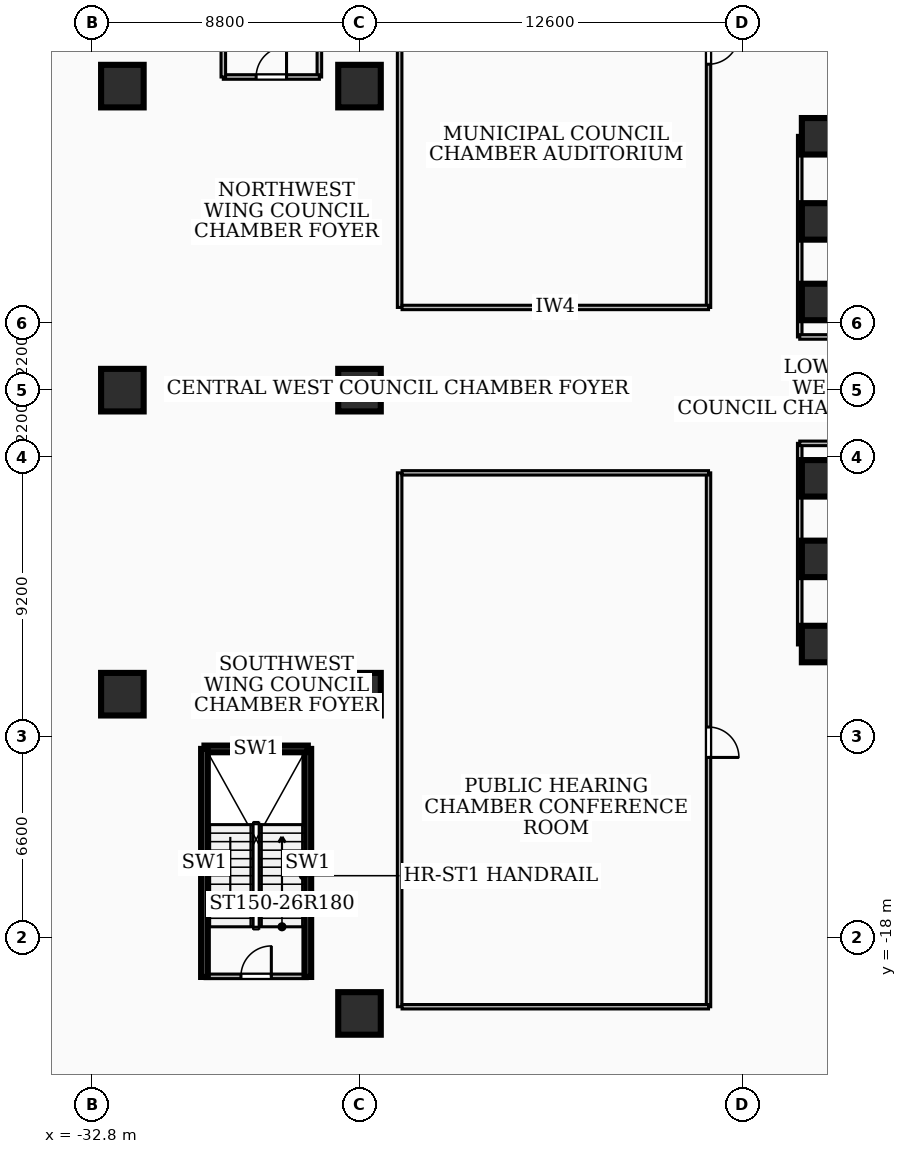
"""IFC4 building model, lengths in metres.
Left out: names, types, materials, properties, quantities, classifications, styles, units other than length and angle.
Written with IfcOpenShell. Run it as: python <this file> out.ifc"""

import sys

from ifc_helpers import new_model, si_unit, direction, frame, frame_2d, origin, origin_2d, place, context, subcontext, project, spatial, rectangle, extrude, element, fill, save


model = new_model("IFC4")
c1 = context("Model", 3, precision=1e-05, world=origin(), true_north=direction((0.0, 1.0)))
c2 = subcontext(c1, "Body", "Model", "MODEL_VIEW")
j1 = project(units=[si_unit("LENGTHUNIT", "METRE"), si_unit("PLANEANGLEUNIT", "RADIAN")], contexts=[c1])
p1 = place(None, origin())
s1 = spatial("IfcSite", under=j1, at=p1, CompositionType="ELEMENT")
p2 = place(p1, origin())
s2 = spatial("IfcBuilding", under=s1, at=p2, CompositionType="ELEMENT")
p3 = place(p2, frame((0.0, 0.0, 10.08)))
s3 = spatial("IfcBuildingStorey", under=s2, at=p3, CompositionType="ELEMENT", Elevation=10.08)
for number, where, z_axis, x_axis in (
    (1, (-8.78, 8.585, 0.0), (0.0, 0.0, 1.0), (1.0, 0.0, 0.0)),
    (2, (8.78, -8.585, 0.0), (0.0, 0.0, 1.0), (-1.0, 0.0, 0.0)),
):
    element("IfcWall", number, at=place(p3, frame(where, z_axis=z_axis, x_axis=x_axis)), inside=s3, PredefinedType="SHEAR", context=c2, shape_type="SweptSolid", body=[
        extrude(rectangle(XDim=17.56, YDim=0.55, at=frame_2d((8.78, 0.0))), origin(), (0.0, 0.0, 1.0), 4.36),
    ])
for number, where, z_axis, x_axis in (
    (3, (-29.1, -19.3, 0.0), (0.0, 0.0, 1.0), (0.0, 1.0, 0.0)),
    (4, (-25.7, -19.3, 0.0), (0.0, 0.0, 1.0), (0.0, 1.0, 0.0)),
):
    element("IfcWall", number, at=place(p3, frame(where, z_axis=z_axis, x_axis=x_axis)), inside=s3, PredefinedType="SOLIDWALL", context=c2, shape_type="SweptSolid", body=[
        extrude(rectangle(XDim=7.5, YDim=0.22, at=frame_2d((3.75, 0.0))), origin(), (0.0, 0.0, 1.0), 4.36),
    ])
p4 = place(p3, frame((-29.1, -11.8, 0.0), z_axis=(0.0, 0.0, 1.0), x_axis=(1.0, 0.0, 0.0)))
e5 = element("IfcWall", 5, at=p4, inside=s3, PredefinedType="SOLIDWALL", context=c2, shape_type="SweptSolid", body=[
    extrude(rectangle(XDim=3.4, YDim=0.22, at=frame_2d((1.7, 0.0))), origin(), (0.0, 0.0, 1.0), 4.36),
])
for number, where, z_axis, x_axis in (
    (6, (-8.85, -5.55, 0.0), (0.0, 0.0, 1.0), (1.0, 0.0, 0.0)),
    (7, (-8.85, -2.9, 0.0), (0.0, 0.0, 1.0), (1.0, 0.0, 0.0)),
    (8, (-8.85, 2.9, 0.0), (0.0, 0.0, 1.0), (1.0, 0.0, 0.0)),
    (9, (-8.85, 5.55, 0.0), (0.0, 0.0, 1.0), (1.0, 0.0, 0.0)),
    (10, (-8.85, 8.35, 0.0), (0.0, 0.0, 1.0), (1.0, 0.0, 0.0)),
    (11, (-8.85, -8.35, 0.0), (0.0, 0.0, 1.0), (1.0, 0.0, 0.0)),
):
    element("IfcColumn", number, at=place(p3, frame(where, z_axis=z_axis, x_axis=x_axis)), inside=s3, PredefinedType="COLUMN", context=c2, shape_type="SweptSolid", body=[
        extrude(rectangle(XDim=1.2, YDim=1.2, at=origin_2d()), origin(), (0.0, 0.0, 1.0), 4.68),
    ])
for number, where, z_axis, x_axis in (
    (12, (-31.8, -10.0, 0.0), (0.0, 0.0, 1.0), (1.0, 0.0, 0.0)),
    (13, (-31.8, 0.0, 0.0), (0.0, 0.0, 1.0), (1.0, 0.0, 0.0)),
    (14, (-31.8, 10.0, 0.0), (0.0, 0.0, 1.0), (1.0, 0.0, 0.0)),
    (15, (-24.0, -10.0, 0.0), (0.0, 0.0, 1.0), (1.0, 0.0, 0.0)),
    (16, (-24.0, 0.0, 0.0), (0.0, 0.0, 1.0), (1.0, 0.0, 0.0)),
    (17, (-24.0, 10.0, 0.0), (0.0, 0.0, 1.0), (1.0, 0.0, 0.0)),
    (18, (-24.0, -20.5, 0.0), (0.0, 0.0, 1.0), (1.0, 0.0, 0.0)),
):
    element("IfcColumn", number, at=place(p3, frame(where, z_axis=z_axis, x_axis=x_axis)), inside=s3, PredefinedType="COLUMN", context=c2, shape_type="SweptSolid", body=[
        extrude(rectangle(XDim=1.4, YDim=1.4, at=origin_2d()), origin(), (0.0, 0.0, 1.0), 4.68),
    ])
p5 = place(p3, frame((-29.08, -19.28, 0.0), z_axis=(0.0, 0.0, 1.0), x_axis=(1.0, 0.0, 0.0)))
e19 = element("IfcWall", 19, at=p5, inside=s3, PredefinedType="PARTITIONING", context=c2, shape_type="SweptSolid", body=[
    extrude(rectangle(XDim=3.36, YDim=0.15, at=frame_2d((1.68, 0.0))), origin(), (0.0, 0.0, 1.0), 4.36),
])
p6 = place(p5, frame((1.18, 0.0, 0.0)))
e20 = element("IfcOpeningElement", 20, at=p6, cuts=e19, PredefinedType="OPENING", context=c2, shape_type="SweptSolid", body=[
    extrude(rectangle(XDim=1.0, YDim=2.1, at=frame_2d((0.5, 1.05))), frame((0.0, 0.085, 0.0), z_axis=(0.0, -1.0, 0.0), x_axis=(1.0, 0.0, 0.0)), (0.0, 0.0, 1.0), 0.17),
])
for number, where, z_axis, x_axis in (
    (21, (-28.48, 10.3, 0.0), (0.0, 0.0, 1.0), (0.0, 1.0, 0.0)),
    (22, (-25.32, 10.3, 0.0), (0.0, 0.0, 1.0), (0.0, 1.0, 0.0)),
):
    element("IfcWall", number, at=place(p3, frame(where, z_axis=z_axis, x_axis=x_axis)), inside=s3, PredefinedType="PARTITIONING", context=c2, shape_type="SweptSolid", body=[
        extrude(rectangle(XDim=9.8, YDim=0.15, at=frame_2d((4.9, 0.0))), origin(), (0.0, 0.0, 1.0), 4.36),
    ])
p7 = place(p3, frame((-28.48, 10.3, 0.0), z_axis=(0.0, 0.0, 1.0), x_axis=(1.0, 0.0, 0.0)))
e23 = element("IfcWall", 23, at=p7, inside=s3, PredefinedType="PARTITIONING", context=c2, shape_type="SweptSolid", body=[
    extrude(rectangle(XDim=3.16, YDim=0.15, at=frame_2d((1.58, 0.0))), origin(), (0.0, 0.0, 1.0), 3.37),
])
p8 = place(p7, frame((1.08, 0.0, 0.0)))
e24 = element("IfcOpeningElement", 24, at=p8, cuts=e23, PredefinedType="OPENING", context=c2, shape_type="SweptSolid", body=[
    extrude(rectangle(XDim=1.0, YDim=2.1, at=frame_2d((0.5, 1.05))), frame((0.0, 0.085, 0.0), z_axis=(0.0, -1.0, 0.0), x_axis=(1.0, 0.0, 0.0)), (0.0, 0.0, 1.0), 0.17),
])
p9 = place(p3, frame((-9.52, 1.75, 0.0), z_axis=(0.0, 0.0, 1.0), x_axis=(0.0, 1.0, 0.0)))
e25 = element("IfcWall", 25, at=p9, inside=s3, PredefinedType="PARTITIONING", context=c2, shape_type="SweptSolid", body=[
    extrude(rectangle(XDim=6.63, YDim=0.15, at=frame_2d((3.315, 0.0))), origin(), (0.0, 0.0, 1.0), 3.37),
])
p10 = place(p3, frame((-7.85, 1.75, 0.0), z_axis=(0.0, 0.0, 1.0), x_axis=(-1.0, 0.0, 0.0)))
e26 = element("IfcWall", 26, at=p10, inside=s3, PredefinedType="PARTITIONING", context=c2, shape_type="SweptSolid", body=[
    extrude(rectangle(XDim=1.67, YDim=0.15, at=frame_2d((0.835, 0.0))), origin(), (0.0, 0.0, 1.0), 3.425),
])
p11 = place(p3, frame((-9.52, -8.38, 0.0), z_axis=(0.0, 0.0, 1.0), x_axis=(0.0, 1.0, 0.0)))
e27 = element("IfcWall", 27, at=p11, inside=s3, PredefinedType="PARTITIONING", context=c2, shape_type="SweptSolid", body=[
    extrude(rectangle(XDim=6.63, YDim=0.15, at=frame_2d((3.315, 0.0))), origin(), (0.0, 0.0, 1.0), 3.37),
])
p12 = place(p3, frame((-7.85, -1.75, 0.0), z_axis=(0.0, 0.0, 1.0), x_axis=(-1.0, 0.0, 0.0)))
e28 = element("IfcWall", 28, at=p12, inside=s3, PredefinedType="PARTITIONING", context=c2, shape_type="SweptSolid", body=[
    extrude(rectangle(XDim=1.67, YDim=0.15, at=frame_2d((0.835, 0.0))), origin(), (0.0, 0.0, 1.0), 3.425),
])
p13 = place(p3, frame((-12.52, 19.88, 0.0), z_axis=(0.0, 0.0, 1.0), x_axis=(0.0, -1.0, 0.0)))
e29 = element("IfcWall", 29, at=p13, inside=s3, PredefinedType="PARTITIONING", context=c2, shape_type="SweptSolid", body=[
    extrude(rectangle(XDim=17.16, YDim=0.145, at=frame_2d((8.58, 0.0))), origin(), (0.0, 0.0, 1.0), 3.37),
])
p14 = place(p13, frame((8.16, 0.0, 0.0)))
e30 = element("IfcOpeningElement", 30, at=p14, cuts=e29, PredefinedType="OPENING", context=c2, shape_type="SweptSolid", body=[
    extrude(rectangle(XDim=1.0, YDim=2.1, at=frame_2d((0.5, 1.05))), frame((0.0, 0.083, 0.0), z_axis=(0.0, -1.0, 0.0), x_axis=(1.0, 0.0, 0.0)), (0.0, 0.0, 1.0), 0.165),
])
p15 = place(p3, frame((-22.6, 2.72, 0.0), z_axis=(0.0, 0.0, 1.0), x_axis=(1.0, 0.0, 0.0)))
e31 = element("IfcWall", 31, at=p15, inside=s3, PredefinedType="PARTITIONING", context=c2, shape_type="SweptSolid", body=[
    extrude(rectangle(XDim=10.08, YDim=0.145, at=frame_2d((5.04, 0.0))), origin(), (0.0, 0.0, 1.0), 4.36),
])
p16 = place(p3, frame((-22.68, 2.72, 0.0), z_axis=(0.0, 0.0, 1.0), x_axis=(0.0, 1.0, 0.0)))
e32 = element("IfcWall", 32, at=p16, inside=s3, PredefinedType="PARTITIONING", context=c2, shape_type="SweptSolid", body=[
    extrude(rectangle(XDim=17.16, YDim=0.15, at=frame_2d((8.58, 0.0))), origin(), (0.0, 0.0, 1.0), 3.37),
])
p17 = place(p3, frame((-12.52, -2.72, 0.0), z_axis=(0.0, 0.0, 1.0), x_axis=(0.0, -1.0, 0.0)))
e33 = element("IfcWall", 33, at=p17, inside=s3, PredefinedType="PARTITIONING", context=c2, shape_type="SweptSolid", body=[
    extrude(rectangle(XDim=17.56, YDim=0.145, at=frame_2d((8.78, 0.0))), origin(), (0.0, 0.0, 1.0), 3.37),
])
p18 = place(p17, frame((8.36, 0.0, 0.0)))
e34 = element("IfcOpeningElement", 34, at=p18, cuts=e33, PredefinedType="OPENING", context=c2, shape_type="SweptSolid", body=[
    extrude(rectangle(XDim=1.0, YDim=2.1, at=frame_2d((0.5, 1.05))), frame((0.0, 0.083, 0.0), z_axis=(0.0, -1.0, 0.0), x_axis=(1.0, 0.0, 0.0)), (0.0, 0.0, 1.0), 0.165),
])
for number, where, z_axis, x_axis in (
    (35, (-22.6, -20.28, 0.0), (0.0, 0.0, 1.0), (1.0, 0.0, 0.0)),
    (36, (-22.6, -2.72, 0.0), (0.0, 0.0, 1.0), (1.0, 0.0, 0.0)),
):
    element("IfcWall", number, at=place(p3, frame(where, z_axis=z_axis, x_axis=x_axis)), inside=s3, PredefinedType="PARTITIONING", context=c2, shape_type="SweptSolid", body=[
        extrude(rectangle(XDim=10.08, YDim=0.145, at=frame_2d((5.04, 0.0))), origin(), (0.0, 0.0, 1.0), 4.36),
    ])
p19 = place(p3, frame((-22.68, -20.28, 0.0), z_axis=(0.0, 0.0, 1.0), x_axis=(0.0, 1.0, 0.0)))
e37 = element("IfcWall", 37, at=p19, inside=s3, PredefinedType="PARTITIONING", context=c2, shape_type="SweptSolid", body=[
    extrude(rectangle(XDim=17.56, YDim=0.15, at=frame_2d((8.78, 0.0))), origin(), (0.0, 0.0, 1.0), 3.37),
])
p20 = place(p6, origin())
e38 = element("IfcDoor", 38, at=p20, inside=s3, OperationType="SINGLE_SWING_RIGHT", PredefinedType="DOOR", context=c2, shape_type="SweptSolid", body=[
    extrude(rectangle(XDim=1.0, YDim=2.1, at=frame_2d((0.5, 1.05))), frame((0.0, 0.025, 0.0), z_axis=(0.0, -1.0, 0.0), x_axis=(1.0, 0.0, 0.0)), (0.0, 0.0, 1.0), 0.05),
])
fill(e20, e38)
p21 = place(p8, origin())
e39 = element("IfcDoor", 39, at=p21, inside=s3, OperationType="SINGLE_SWING_RIGHT", PredefinedType="DOOR", context=c2, shape_type="SweptSolid", body=[
    extrude(rectangle(XDim=1.0, YDim=2.1, at=frame_2d((0.5, 1.05))), frame((0.0, 0.025, 0.0), z_axis=(0.0, -1.0, 0.0), x_axis=(1.0, 0.0, 0.0)), (0.0, 0.0, 1.0), 0.05),
])
fill(e24, e39)
p22 = place(p14, origin())
e40 = element("IfcDoor", 40, at=p22, inside=s3, OperationType="SINGLE_SWING_LEFT", PredefinedType="DOOR", context=c2, shape_type="SweptSolid", body=[
    extrude(rectangle(XDim=1.0, YDim=2.1, at=frame_2d((0.5, 1.05))), frame((0.0, 0.025, 0.0), z_axis=(0.0, -1.0, 0.0), x_axis=(1.0, 0.0, 0.0)), (0.0, 0.0, 1.0), 0.05),
])
fill(e30, e40)
p23 = place(p18, origin())
e41 = element("IfcDoor", 41, at=p23, inside=s3, OperationType="SINGLE_SWING_RIGHT", PredefinedType="DOOR", context=c2, shape_type="SweptSolid", body=[
    extrude(rectangle(XDim=1.0, YDim=2.1, at=frame_2d((0.5, 1.05))), frame((0.0, 0.025, 0.0), z_axis=(0.0, -1.0, 0.0), x_axis=(1.0, 0.0, 0.0)), (0.0, 0.0, 1.0), 0.05),
])
fill(e34, e41)
save(model, sys.argv[1])
